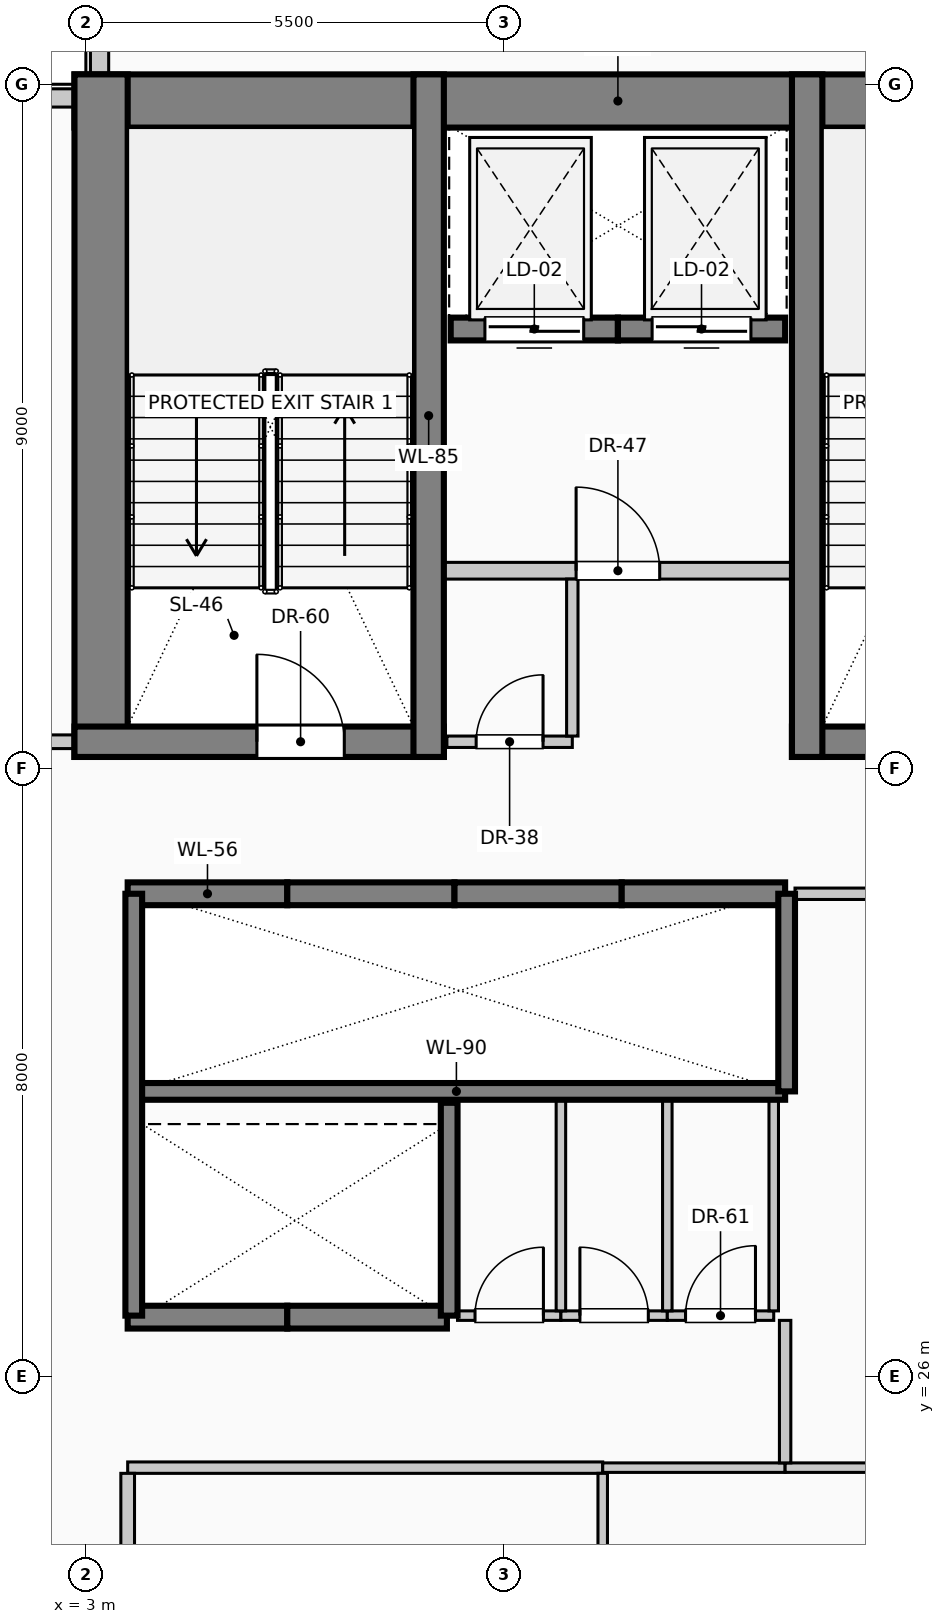
"""IFC4 building model, lengths in metres.
Left out: names, types, materials, properties, quantities, classifications, styles, units other than length and angle.
Written with IfcOpenShell. Run it as: python <this file> out.ifc"""

import sys

from ifc_helpers import new_model, si_unit, direction, frame, frame_2d, origin, place, context, subcontext, project, spatial, rectangle, extrude, element, fill, save


model = new_model("IFC4")
c1 = context("Model", 3, precision=1e-05, world=origin(), true_north=direction((0.0, 1.0)))
c2 = subcontext(c1, "Body", "Model", "MODEL_VIEW")
j1 = project(units=[si_unit("LENGTHUNIT", "METRE"), si_unit("PLANEANGLEUNIT", "RADIAN")], contexts=[c1])
p1 = place(None, origin())
s1 = spatial("IfcSite", under=j1, at=p1, CompositionType="ELEMENT")
p2 = place(p1, origin())
s2 = spatial("IfcBuilding", under=s1, at=p2, CompositionType="ELEMENT")
p3 = place(p2, frame((0.0, 0.0, 182.6)))
s3 = spatial("IfcBuildingStorey", under=s2, at=p3, CompositionType="ELEMENT", Elevation=182.6)
p4 = place(p3, frame((2.85, 42.78, 0.0), z_axis=(0.0, 0.0, 1.0), x_axis=(1.0, 0.0, 0.0)))
e1 = element("IfcWall", 1, at=p4, inside=s3, PredefinedType="SHEAR", context=c2, shape_type="SweptSolid", body=[
    extrude(rectangle(XDim=14.3, YDim=0.7, at=frame_2d((7.15, 0.0))), origin(), (0.0, 0.0, 1.0), 4.0),
])
p5 = place(p3, frame((3.2, 34.15, 0.0), z_axis=(0.0, 0.0, 1.0), x_axis=(0.0, 1.0, 0.0)))
e2 = element("IfcWall", 2, at=p5, inside=s3, PredefinedType="SHEAR", context=c2, shape_type="SweptSolid", body=[
    extrude(rectangle(XDim=8.98, YDim=0.7, at=frame_2d((4.49, 0.0))), origin(), (0.0, 0.0, 1.0), 4.0),
])
p6 = place(p3, frame((2.85, 34.35, 0.0), z_axis=(0.0, 0.0, 1.0), x_axis=(1.0, 0.0, 0.0)))
e3 = element("IfcWall", 3, at=p6, inside=s3, PredefinedType="SHEAR", context=c2, shape_type="SweptSolid", body=[
    extrude(rectangle(XDim=4.86, YDim=0.4, at=frame_2d((2.43, 0.0))), origin(), (0.0, 0.0, 1.0), 4.0),
])
p7 = place(p6, frame((2.4, 0.0, 0.0)))
e4 = element("IfcOpeningElement", 4, at=p7, cuts=e3, PredefinedType="OPENING", context=c2, shape_type="SweptSolid", body=[
    extrude(rectangle(XDim=1.15, YDim=2.2, at=frame_2d((0.575, 1.1))), frame((0.0, 0.21, 0.0), z_axis=(0.0, -1.0, 0.0), x_axis=(1.0, 0.0, 0.0)), (0.0, 0.0, 1.0), 0.42),
])
p8 = place(p3, frame((12.29, 34.35, 0.0), z_axis=(0.0, 0.0, 1.0), x_axis=(1.0, 0.0, 0.0)))
e5 = element("IfcWall", 5, at=p8, inside=s3, PredefinedType="SHEAR", context=c2, shape_type="SweptSolid", body=[
    extrude(rectangle(XDim=4.86, YDim=0.4, at=frame_2d((2.43, 0.0))), origin(), (0.0, 0.0, 1.0), 4.0),
])
p9 = place(p8, frame((1.4, 0.0, 0.0)))
e6 = element("IfcOpeningElement", 6, at=p9, cuts=e5, PredefinedType="OPENING", context=c2, shape_type="SweptSolid", body=[
    extrude(rectangle(XDim=1.15, YDim=2.2, at=frame_2d((0.575, 1.1))), frame((0.0, 0.21, 0.0), z_axis=(0.0, -1.0, 0.0), x_axis=(1.0, 0.0, 0.0)), (0.0, 0.0, 1.0), 0.42),
])
for number, where, z_axis, x_axis in (
    (7, (7.51, 34.15, 0.0), (0.0, 0.0, 1.0), (0.0, 1.0, 0.0)),
    (8, (12.49, 34.15, 0.0), (0.0, 0.0, 1.0), (0.0, 1.0, 0.0)),
):
    element("IfcWall", number, at=place(p3, frame(where, z_axis=z_axis, x_axis=x_axis)), inside=s3, PredefinedType="SHEAR", context=c2, shape_type="SweptSolid", body=[
        extrude(rectangle(XDim=8.98, YDim=0.4, at=frame_2d((4.49, 0.0))), origin(), (0.0, 0.0, 1.0), 4.0),
    ])
p10 = place(p3, frame((0.6, 42.82, 0.0), z_axis=(0.0, 0.0, 1.0), x_axis=(1.0, 0.0, 0.0)))
e9 = element("IfcWall", 9, at=p10, inside=s3, PredefinedType="SOLIDWALL", context=c2, shape_type="SweptSolid", body=[
    extrude(rectangle(XDim=2.245, YDim=0.24, at=frame_2d((1.123, 0.0))), origin(), (0.0, 0.0, 1.0), 3.75),
])
p11 = place(p3, frame((3.18, 43.135, 0.0), z_axis=(0.0, 0.0, 1.0), x_axis=(0.0, 1.0, 0.0)))
e10 = element("IfcWall", 10, at=p11, inside=s3, PredefinedType="SOLIDWALL", context=c2, shape_type="SweptSolid", body=[
    extrude(rectangle(XDim=2.265, YDim=0.24, at=frame_2d((1.132, 0.0))), origin(), (0.0, 0.0, 1.0), 3.75),
])
p12 = place(p3, frame((3.55, 32.35, 0.0), z_axis=(0.0, 0.0, 1.0), x_axis=(1.0, 0.0, 0.0)))
e11 = element("IfcWall", 11, at=p12, inside=s3, PredefinedType="SOLIDWALL", context=c2, shape_type="SweptSolid", body=[
    extrude(rectangle(XDim=2.1, YDim=0.3, at=frame_2d((1.05, 0.0))), origin(), (0.0, 0.0, 1.0), 4.0),
])
p13 = place(p3, frame((5.65, 32.35, 0.0), z_axis=(0.0, 0.0, 1.0), x_axis=(1.0, 0.0, 0.0)))
e12 = element("IfcWall", 12, at=p13, inside=s3, PredefinedType="SOLIDWALL", context=c2, shape_type="SweptSolid", body=[
    extrude(rectangle(XDim=2.2, YDim=0.3, at=frame_2d((1.1, 0.0))), origin(), (0.0, 0.0, 1.0), 4.0),
])
p14 = place(p3, frame((7.85, 32.35, 0.0), z_axis=(0.0, 0.0, 1.0), x_axis=(1.0, 0.0, 0.0)))
e13 = element("IfcWall", 13, at=p14, inside=s3, PredefinedType="SOLIDWALL", context=c2, shape_type="SweptSolid", body=[
    extrude(rectangle(XDim=2.2, YDim=0.3, at=frame_2d((1.1, 0.0))), origin(), (0.0, 0.0, 1.0), 4.0),
])
p15 = place(p3, frame((10.05, 32.35, 0.0), z_axis=(0.0, 0.0, 1.0), x_axis=(1.0, 0.0, 0.0)))
e14 = element("IfcWall", 14, at=p15, inside=s3, PredefinedType="SOLIDWALL", context=c2, shape_type="SweptSolid", body=[
    extrude(rectangle(XDim=2.15, YDim=0.3, at=frame_2d((1.075, 0.0))), origin(), (0.0, 0.0, 1.0), 4.0),
])
p16 = place(p3, frame((5.65, 26.78, 0.0), z_axis=(0.0, 0.0, 1.0), x_axis=(-1.0, 0.0, 0.0)))
e15 = element("IfcWall", 15, at=p16, inside=s3, PredefinedType="SOLIDWALL", context=c2, shape_type="SweptSolid", body=[
    extrude(rectangle(XDim=2.1, YDim=0.3, at=frame_2d((1.05, 0.0))), origin(), (0.0, 0.0, 1.0), 4.0),
])
p17 = place(p3, frame((7.75, 26.78, 0.0), z_axis=(0.0, 0.0, 1.0), x_axis=(-1.0, 0.0, 0.0)))
e16 = element("IfcWall", 16, at=p17, inside=s3, PredefinedType="SOLIDWALL", context=c2, shape_type="SweptSolid", body=[
    extrude(rectangle(XDim=2.1, YDim=0.3, at=frame_2d((1.05, 0.0))), origin(), (0.0, 0.0, 1.0), 4.0),
])
p18 = place(p3, frame((10.0, 39.78, 0.0), z_axis=(0.0, 0.0, 1.0), x_axis=(-1.0, 0.0, 0.0)))
e17 = element("IfcWall", 17, at=p18, inside=s3, PredefinedType="SOLIDWALL", context=c2, shape_type="SweptSolid", body=[
    extrude(rectangle(XDim=2.2, YDim=0.3, at=frame_2d((1.1, 0.0))), origin(), (0.0, 0.0, 1.0), 4.0),
])
p19 = place(p18, frame((0.45, 0.0, 0.0)))
e18 = element("IfcOpeningElement", 18, at=p19, cuts=e17, PredefinedType="OPENING", context=c2, shape_type="SweptSolid", body=[
    extrude(rectangle(XDim=1.3, YDim=2.25, at=frame_2d((0.65, 1.125))), frame((0.0, 0.16, 0.0), z_axis=(0.0, -1.0, 0.0), x_axis=(1.0, 0.0, 0.0)), (0.0, 0.0, 1.0), 0.32),
])
p20 = place(p3, frame((12.2, 39.78, 0.0), z_axis=(0.0, 0.0, 1.0), x_axis=(-1.0, 0.0, 0.0)))
e19 = element("IfcWall", 19, at=p20, inside=s3, PredefinedType="SOLIDWALL", context=c2, shape_type="SweptSolid", body=[
    extrude(rectangle(XDim=2.2, YDim=0.3, at=frame_2d((1.1, 0.0))), origin(), (0.0, 0.0, 1.0), 4.0),
])
p21 = place(p20, frame((0.45, 0.0, 0.0)))
e20 = element("IfcOpeningElement", 20, at=p21, cuts=e19, PredefinedType="OPENING", context=c2, shape_type="SweptSolid", body=[
    extrude(rectangle(XDim=1.3, YDim=2.25, at=frame_2d((0.65, 1.125))), frame((0.0, 0.16, 0.0), z_axis=(0.0, -1.0, 0.0), x_axis=(1.0, 0.0, 0.0)), (0.0, 0.0, 1.0), 0.32),
])
p22 = place(p3, frame((3.55, 29.75, 0.0), z_axis=(0.0, 0.0, 1.0), x_axis=(1.0, 0.0, 0.0)))
e21 = element("IfcWall", 21, at=p22, inside=s3, PredefinedType="SOLIDWALL", context=c2, shape_type="SweptSolid", body=[
    extrude(rectangle(XDim=8.65, YDim=0.22, at=frame_2d((4.325, 0.0))), origin(), (0.0, 0.0, 1.0), 4.0),
])
p23 = place(p3, frame((3.63, 26.8, 0.0), z_axis=(0.0, 0.0, 1.0), x_axis=(0.0, 1.0, 0.0)))
e22 = element("IfcWall", 22, at=p23, inside=s3, PredefinedType="SOLIDWALL", context=c2, shape_type="SweptSolid", body=[
    extrude(rectangle(XDim=5.55, YDim=0.22, at=frame_2d((2.775, 0.0))), origin(), (0.0, 0.0, 1.0), 4.0),
])
p24 = place(p3, frame((7.78, 26.8, 0.0), z_axis=(0.0, 0.0, 1.0), x_axis=(0.0, 1.0, 0.0)))
e23 = element("IfcWall", 23, at=p24, inside=s3, PredefinedType="SOLIDWALL", context=c2, shape_type="SweptSolid", body=[
    extrude(rectangle(XDim=2.8, YDim=0.22, at=frame_2d((1.4, 0.0))), origin(), (0.0, 0.0, 1.0), 4.0),
])
p25 = place(p3, frame((12.22, 29.75, 0.0), z_axis=(0.0, 0.0, 1.0), x_axis=(0.0, 1.0, 0.0)))
e24 = element("IfcWall", 24, at=p25, inside=s3, PredefinedType="SOLIDWALL", context=c2, shape_type="SweptSolid", body=[
    extrude(rectangle(XDim=2.6, YDim=0.22, at=frame_2d((1.3, 0.0))), origin(), (0.0, 0.0, 1.0), 4.0),
])
p26 = place(p3, frame((7.51, 36.6, 0.0), z_axis=(0.0, 0.0, 1.0), x_axis=(1.0, 0.0, 0.0)))
e25 = element("IfcWall", 25, at=p26, inside=s3, PredefinedType="PARTITIONING", context=c2, shape_type="SweptSolid", body=[
    extrude(rectangle(XDim=4.98, YDim=0.22, at=frame_2d((2.49, 0.0))), origin(), (0.0, 0.0, 1.0), 3.75),
])
p27 = place(p26, frame((1.94, 0.0, 0.0)))
e26 = element("IfcOpeningElement", 26, at=p27, cuts=e25, PredefinedType="OPENING", context=c2, shape_type="SweptSolid", body=[
    extrude(rectangle(XDim=1.1, YDim=2.2, at=frame_2d((0.55, 1.1))), frame((0.0, 0.12, 0.0), z_axis=(0.0, -1.0, 0.0), x_axis=(1.0, 0.0, 0.0)), (0.0, 0.0, 1.0), 0.24),
])
p28 = place(p3, frame((3.55, 24.8, 0.0), z_axis=(0.0, 0.0, 1.0), x_axis=(1.0, 0.0, 0.0)))
e27 = element("IfcWall", 27, at=p28, inside=s3, PredefinedType="PARTITIONING", context=c2, shape_type="SweptSolid", body=[
    extrude(rectangle(XDim=6.25, YDim=0.15, at=frame_2d((3.125, 0.0))), origin(), (0.0, 0.0, 1.0), 3.75),
])
p29 = place(p3, frame((9.8, 24.8, 0.0), z_axis=(0.0, 0.0, 1.0), x_axis=(1.0, 0.0, 0.0)))
e28 = element("IfcWall", 28, at=p29, inside=s3, PredefinedType="PARTITIONING", context=c2, shape_type="SweptSolid", body=[
    extrude(rectangle(XDim=2.4, YDim=0.125, at=frame_2d((1.2, 0.0))), origin(), (0.0, 0.0, 1.0), 3.75),
])
p30 = place(p3, frame((12.2, 24.8, 0.0), z_axis=(0.0, 0.0, 1.0), x_axis=(1.0, 0.0, 0.0)))
e29 = element("IfcWall", 29, at=p30, inside=s3, PredefinedType="PARTITIONING", context=c2, shape_type="SweptSolid", body=[
    extrude(rectangle(XDim=3.65, YDim=0.125, at=frame_2d((1.825, 0.0))), origin(), (0.0, 0.0, 1.0), 3.75),
])
p31 = place(p3, frame((7.89, 26.8, 0.0), z_axis=(0.0, 0.0, 1.0), x_axis=(1.0, 0.0, 0.0)))
e30 = element("IfcWall", 30, at=p31, inside=s3, PredefinedType="PARTITIONING", context=c2, shape_type="SweptSolid", body=[
    extrude(rectangle(XDim=1.36, YDim=0.125, at=frame_2d((0.68, 0.0))), origin(), (0.0, 0.0, 1.0), 3.75),
])
p32 = place(p31, frame((0.23, 0.0, 0.0)))
e31 = element("IfcOpeningElement", 31, at=p32, cuts=e30, PredefinedType="OPENING", context=c2, shape_type="SweptSolid", body=[
    extrude(rectangle(XDim=0.9, YDim=2.1, at=frame_2d((0.45, 1.05))), frame((0.0, 0.073, 0.0), z_axis=(0.0, -1.0, 0.0), x_axis=(1.0, 0.0, 0.0)), (0.0, 0.0, 1.0), 0.145),
])
p33 = place(p3, frame((9.25, 26.8, 0.0), z_axis=(0.0, 0.0, 1.0), x_axis=(1.0, 0.0, 0.0)))
e32 = element("IfcWall", 32, at=p33, inside=s3, PredefinedType="PARTITIONING", context=c2, shape_type="SweptSolid", body=[
    extrude(rectangle(XDim=1.4, YDim=0.125, at=frame_2d((0.7, 0.0))), origin(), (0.0, 0.0, 1.0), 3.75),
])
p34 = place(p33, frame((0.25, 0.0, 0.0)))
e33 = element("IfcOpeningElement", 33, at=p34, cuts=e32, PredefinedType="OPENING", context=c2, shape_type="SweptSolid", body=[
    extrude(rectangle(XDim=0.9, YDim=2.1, at=frame_2d((0.45, 1.05))), frame((0.0, 0.073, 0.0), z_axis=(0.0, -1.0, 0.0), x_axis=(1.0, 0.0, 0.0)), (0.0, 0.0, 1.0), 0.145),
])
p35 = place(p3, frame((10.65, 26.8, 0.0), z_axis=(0.0, 0.0, 1.0), x_axis=(1.0, 0.0, 0.0)))
e34 = element("IfcWall", 34, at=p35, inside=s3, PredefinedType="PARTITIONING", context=c2, shape_type="SweptSolid", body=[
    extrude(rectangle(XDim=1.4, YDim=0.125, at=frame_2d((0.7, 0.0))), origin(), (0.0, 0.0, 1.0), 3.75),
])
p36 = place(p35, frame((0.24, 0.0, 0.0)))
e35 = element("IfcOpeningElement", 35, at=p36, cuts=e34, PredefinedType="OPENING", context=c2, shape_type="SweptSolid", body=[
    extrude(rectangle(XDim=0.92, YDim=2.1, at=frame_2d((0.46, 1.05))), frame((0.0, 0.073, 0.0), z_axis=(0.0, -1.0, 0.0), x_axis=(1.0, 0.0, 0.0)), (0.0, 0.0, 1.0), 0.145),
])
p37 = place(p3, frame((12.33, 32.35, 0.0), z_axis=(0.0, 0.0, 1.0), x_axis=(1.0, 0.0, 0.0)))
e36 = element("IfcWall", 36, at=p37, inside=s3, PredefinedType="PARTITIONING", context=c2, shape_type="SweptSolid", body=[
    extrude(rectangle(XDim=3.52, YDim=0.15, at=frame_2d((1.76, 0.0))), origin(), (0.0, 0.0, 1.0), 3.75),
])
p38 = place(p37, frame((1.285, 0.0, 0.0)))
e37 = element("IfcOpeningElement", 37, at=p38, cuts=e36, PredefinedType="OPENING", context=c2, shape_type="SweptSolid", body=[
    extrude(rectangle(XDim=0.95, YDim=2.15, at=frame_2d((0.475, 1.075))), frame((0.0, 0.085, 0.0), z_axis=(0.0, -1.0, 0.0), x_axis=(1.0, 0.0, 0.0)), (0.0, 0.0, 1.0), 0.17),
])
p39 = place(p3, frame((1.15, 34.35, 0.0), z_axis=(0.0, 0.0, 1.0), x_axis=(1.0, 0.0, 0.0)))
e38 = element("IfcWall", 38, at=p39, inside=s3, PredefinedType="PARTITIONING", context=c2, shape_type="SweptSolid", body=[
    extrude(rectangle(XDim=1.7, YDim=0.18, at=frame_2d((0.85, 0.0))), origin(), (0.0, 0.0, 1.0), 3.75),
])
p40 = place(p3, frame((7.75, 34.35, 0.0), z_axis=(0.0, 0.0, 1.0), x_axis=(1.0, 0.0, 0.0)))
e39 = element("IfcWall", 39, at=p40, inside=s3, PredefinedType="PARTITIONING", context=c2, shape_type="SweptSolid", body=[
    extrude(rectangle(XDim=1.65, YDim=0.15, at=frame_2d((0.825, 0.0))), origin(), (0.0, 0.0, 1.0), 3.75),
])
p41 = place(p40, frame((0.385, 0.0, 0.0)))
e40 = element("IfcOpeningElement", 40, at=p41, cuts=e39, PredefinedType="OPENING", context=c2, shape_type="SweptSolid", body=[
    extrude(rectangle(XDim=0.88, YDim=2.1, at=frame_2d((0.44, 1.05))), frame((0.0, 0.085, 0.0), z_axis=(0.0, -1.0, 0.0), x_axis=(1.0, 0.0, 0.0)), (0.0, 0.0, 1.0), 0.17),
])
p42 = place(p3, frame((3.55, 17.39, 0.0), z_axis=(0.0, 0.0, 1.0), x_axis=(0.0, 1.0, 0.0)))
e41 = element("IfcWall", 41, at=p42, inside=s3, PredefinedType="PARTITIONING", context=c2, shape_type="SweptSolid", body=[
    extrude(rectangle(XDim=7.335, YDim=0.18, at=frame_2d((3.667, 0.0))), origin(), (0.0, 0.0, 1.0), 3.75),
])
p43 = place(p3, frame((9.25, 26.863, 0.0), z_axis=(0.0, 0.0, 1.0), x_axis=(0.0, 1.0, 0.0)))
e42 = element("IfcWall", 42, at=p43, inside=s3, PredefinedType="PARTITIONING", context=c2, shape_type="SweptSolid", body=[
    extrude(rectangle(XDim=2.777, YDim=0.125, at=frame_2d((1.389, 0.0))), origin(), (0.0, 0.0, 1.0), 3.75),
])
p44 = place(p3, frame((9.4, 34.425, 0.0), z_axis=(0.0, 0.0, 1.0), x_axis=(0.0, 1.0, 0.0)))
e43 = element("IfcWall", 43, at=p44, inside=s3, PredefinedType="PARTITIONING", context=c2, shape_type="SweptSolid", body=[
    extrude(rectangle(XDim=2.065, YDim=0.15, at=frame_2d((1.032, 0.0))), origin(), (0.0, 0.0, 1.0), 3.75),
])
p45 = place(p3, frame((9.8, 17.39, 0.0), z_axis=(0.0, 0.0, 1.0), x_axis=(0.0, 1.0, 0.0)))
e44 = element("IfcWall", 44, at=p45, inside=s3, PredefinedType="PARTITIONING", context=c2, shape_type="SweptSolid", body=[
    extrude(rectangle(XDim=7.335, YDim=0.125, at=frame_2d((3.667, 0.0))), origin(), (0.0, 0.0, 1.0), 3.75),
])
for number, where, z_axis, x_axis in (
    (45, (10.65, 26.863, 0.0), (0.0, 0.0, 1.0), (0.0, 1.0, 0.0)),
    (46, (12.05, 26.863, 0.0), (0.0, 0.0, 1.0), (0.0, 1.0, 0.0)),
):
    element("IfcWall", number, at=place(p3, frame(where, z_axis=z_axis, x_axis=x_axis)), inside=s3, PredefinedType="PARTITIONING", context=c2, shape_type="SweptSolid", body=[
        extrude(rectangle(XDim=2.777, YDim=0.125, at=frame_2d((1.389, 0.0))), origin(), (0.0, 0.0, 1.0), 3.75),
    ])
p46 = place(p3, frame((12.2, 24.863, 0.0), z_axis=(0.0, 0.0, 1.0), x_axis=(0.0, 1.0, 0.0)))
e47 = element("IfcWall", 47, at=p46, inside=s3, PredefinedType="PARTITIONING", context=c2, shape_type="SweptSolid", body=[
    extrude(rectangle(XDim=1.875, YDim=0.15, at=frame_2d((0.938, 0.0))), origin(), (0.0, 0.0, 1.0), 3.75),
])
p47 = place(p19, origin())
e48 = element("IfcDoor", 48, at=p47, inside=s3, OperationType="SLIDING_TO_LEFT", PredefinedType="DOOR", context=c2, shape_type="SweptSolid", body=[
    extrude(rectangle(XDim=1.3, YDim=2.25, at=frame_2d((0.65, 1.125))), frame((0.0, 0.025, 0.0), z_axis=(0.0, -1.0, 0.0), x_axis=(1.0, 0.0, 0.0)), (0.0, 0.0, 1.0), 0.05),
])
fill(e18, e48)
p48 = place(p21, origin())
e49 = element("IfcDoor", 49, at=p48, inside=s3, OperationType="SLIDING_TO_RIGHT", PredefinedType="DOOR", context=c2, shape_type="SweptSolid", body=[
    extrude(rectangle(XDim=1.3, YDim=2.25, at=frame_2d((0.65, 1.125))), frame((0.0, 0.025, 0.0), z_axis=(0.0, -1.0, 0.0), x_axis=(1.0, 0.0, 0.0)), (0.0, 0.0, 1.0), 0.05),
])
fill(e20, e49)
p49 = place(p7, origin())
e50 = element("IfcDoor", 50, at=p49, inside=s3, OperationType="SINGLE_SWING_LEFT", PredefinedType="DOOR", context=c2, shape_type="SweptSolid", body=[
    extrude(rectangle(XDim=1.15, YDim=2.2, at=frame_2d((0.575, 1.1))), frame((0.0, 0.025, 0.0), z_axis=(0.0, -1.0, 0.0), x_axis=(1.0, 0.0, 0.0)), (0.0, 0.0, 1.0), 0.05),
])
fill(e4, e50)
p50 = place(p27, origin())
e51 = element("IfcDoor", 51, at=p50, inside=s3, OperationType="SINGLE_SWING_LEFT", PredefinedType="DOOR", context=c2, shape_type="SweptSolid", body=[
    extrude(rectangle(XDim=1.1, YDim=2.2, at=frame_2d((0.55, 1.1))), frame((0.0, 0.025, 0.0), z_axis=(0.0, -1.0, 0.0), x_axis=(1.0, 0.0, 0.0)), (0.0, 0.0, 1.0), 0.05),
])
fill(e26, e51)
p51 = place(p32, origin())
e52 = element("IfcDoor", 52, at=p51, inside=s3, OperationType="SINGLE_SWING_RIGHT", PredefinedType="DOOR", context=c2, shape_type="SweptSolid", body=[
    extrude(rectangle(XDim=0.9, YDim=2.1, at=frame_2d((0.45, 1.05))), frame((0.0, 0.025, 0.0), z_axis=(0.0, -1.0, 0.0), x_axis=(1.0, 0.0, 0.0)), (0.0, 0.0, 1.0), 0.05),
])
fill(e31, e52)
p52 = place(p34, origin())
e53 = element("IfcDoor", 53, at=p52, inside=s3, OperationType="SINGLE_SWING_LEFT", PredefinedType="DOOR", context=c2, shape_type="SweptSolid", body=[
    extrude(rectangle(XDim=0.9, YDim=2.1, at=frame_2d((0.45, 1.05))), frame((0.0, 0.025, 0.0), z_axis=(0.0, -1.0, 0.0), x_axis=(1.0, 0.0, 0.0)), (0.0, 0.0, 1.0), 0.05),
])
fill(e33, e53)
p53 = place(p36, origin())
e54 = element("IfcDoor", 54, at=p53, inside=s3, OperationType="SINGLE_SWING_RIGHT", PredefinedType="DOOR", context=c2, shape_type="SweptSolid", body=[
    extrude(rectangle(XDim=0.92, YDim=2.1, at=frame_2d((0.46, 1.05))), frame((0.0, 0.025, 0.0), z_axis=(0.0, -1.0, 0.0), x_axis=(1.0, 0.0, 0.0)), (0.0, 0.0, 1.0), 0.05),
])
fill(e35, e54)
p54 = place(p41, origin())
e55 = element("IfcDoor", 55, at=p54, inside=s3, OperationType="SINGLE_SWING_RIGHT", PredefinedType="DOOR", context=c2, shape_type="SweptSolid", body=[
    extrude(rectangle(XDim=0.88, YDim=2.1, at=frame_2d((0.44, 1.05))), frame((0.0, 0.025, 0.0), z_axis=(0.0, -1.0, 0.0), x_axis=(1.0, 0.0, 0.0)), (0.0, 0.0, 1.0), 0.05),
])
fill(e40, e55)
save(model, sys.argv[1])
